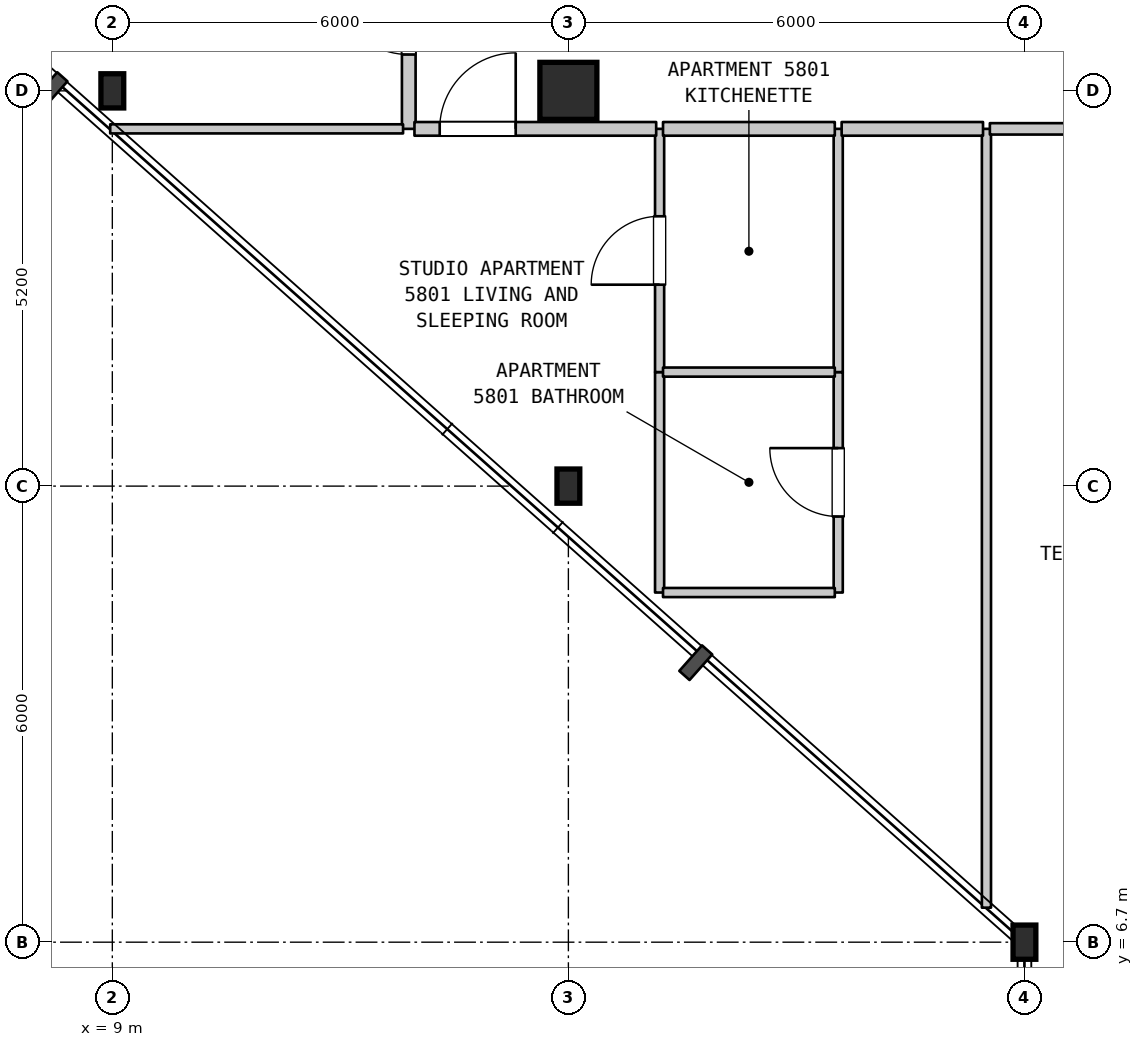
"""IFC4 building model, lengths in metres.
Left out: names, types, materials, properties, quantities, classifications, styles, units other than length and angle.
Written with IfcOpenShell. Run it as: python <this file> out.ifc"""

import sys

from ifc_helpers import new_model, si_unit, direction, frame, frame_2d, origin, origin_2d, place, context, subcontext, project, spatial, rectangle, i_section, extrude, element, fill, save


model = new_model("IFC4")
c1 = context("Model", 3, precision=1e-05, world=origin(), true_north=direction((0.0, 1.0)))
c2 = subcontext(c1, "Body", "Model", "MODEL_VIEW")
j1 = project(units=[si_unit("LENGTHUNIT", "METRE"), si_unit("PLANEANGLEUNIT", "RADIAN")], contexts=[c1])
p1 = place(None, origin())
s1 = spatial("IfcSite", under=j1, at=p1, CompositionType="ELEMENT")
p2 = place(p1, origin())
s2 = spatial("IfcBuilding", under=s1, at=p2, CompositionType="ELEMENT")
p3 = place(p2, frame((0.0, 0.0, 233.9)))
s3 = spatial("IfcBuildingStorey", under=s2, at=p3, CompositionType="ELEMENT", Elevation=233.9)
for number, where, z_axis, x_axis in (
    (1, (9.0, 17.9, 0.0), (0.0, 0.0, 1.0), (1.0, 0.0, 0.0)),
    (2, (15.0, 12.7, 0.0), (0.0, 0.0, 1.0), (1.0, 0.0, 0.0)),
):
    element("IfcColumn", number, at=place(p3, frame(where, z_axis=z_axis, x_axis=x_axis)), inside=s3, PredefinedType="COLUMN", context=c2, shape_type="SweptSolid", body=[
        extrude(i_section(OverallWidth=0.3, OverallDepth=0.45, WebThickness=0.014, FlangeThickness=0.026, FilletRadius=0.027, at=origin_2d()), origin(), (0.0, 0.0, 1.0), 3.7),
    ])
p4 = place(p3, frame((15.0, 17.9, 0.0), z_axis=(0.0, 0.0, 1.0), x_axis=(1.0, 0.0, 0.0)))
e3 = element("IfcColumn", 3, at=p4, inside=s3, PredefinedType="COLUMN", context=c2, shape_type="SweptSolid", body=[
    extrude(rectangle(XDim=0.75, YDim=0.75, at=origin_2d()), origin(), (0.0, 0.0, 1.0), 3.7),
])
p5 = place(p3, frame((21.0, 6.7, 0.0), z_axis=(0.0, 0.0, 1.0), x_axis=(1.0, 0.0, 0.0)))
e4 = element("IfcColumn", 4, at=p5, inside=s3, PredefinedType="COLUMN", context=c2, shape_type="SweptSolid", body=[
    extrude(i_section(OverallWidth=0.3, OverallDepth=0.45, WebThickness=0.014, FlangeThickness=0.026, FilletRadius=0.027, at=origin_2d()), origin(), (0.0, 0.0, 1.0), 3.7),
])
p6 = place(p3, frame((12.9, 17.4, 0.0), z_axis=(0.0, 0.0, 1.0), x_axis=(0.0, 1.0, 0.0)))
e5 = element("IfcWall", 5, at=p6, inside=s3, PredefinedType="STANDARD", context=c2, shape_type="SweptSolid", body=[
    extrude(rectangle(XDim=3.1, YDim=0.18, at=frame_2d((1.55, 0.0))), origin(), (0.0, 0.0, 1.0), 3.28),
])
p7 = place(p6, frame((0.978, 0.0, 0.0)))
e6 = element("IfcOpeningElement", 6, at=p7, cuts=e5, PredefinedType="OPENING", context=c2, shape_type="SweptSolid", body=[
    extrude(rectangle(XDim=1.0, YDim=2.15, at=frame_2d((0.5, 1.075))), frame((0.0, 0.1, 0.0), z_axis=(0.0, -1.0, 0.0), x_axis=(1.0, 0.0, 0.0)), (0.0, 0.0, 1.0), 0.2),
])
p8 = place(p3, frame((16.2, 11.3, 0.0), z_axis=(0.0, 0.0, 1.0), x_axis=(0.0, 1.0, 0.0)))
e7 = element("IfcWall", 7, at=p8, inside=s3, PredefinedType="PARTITIONING", context=c2, shape_type="SweptSolid", body=[
    extrude(rectangle(XDim=2.9, YDim=0.12, at=frame_2d((1.45, 0.0))), origin(), (0.0, 0.0, 1.0), 3.28),
])
p9 = place(p3, frame((16.2, 14.2, 0.0), z_axis=(0.0, 0.0, 1.0), x_axis=(0.0, 1.0, 0.0)))
e8 = element("IfcWall", 8, at=p9, inside=s3, PredefinedType="PARTITIONING", context=c2, shape_type="SweptSolid", body=[
    extrude(rectangle(XDim=3.2, YDim=0.12, at=frame_2d((1.6, 0.0))), origin(), (0.0, 0.0, 1.0), 3.28),
])
p10 = place(p9, frame((1.15, 0.0, 0.0)))
e9 = element("IfcOpeningElement", 9, at=p10, cuts=e8, PredefinedType="OPENING", context=c2, shape_type="SweptSolid", body=[
    extrude(rectangle(XDim=0.9, YDim=2.15, at=frame_2d((0.45, 1.075))), frame((0.0, 0.07, 0.0), z_axis=(0.0, -1.0, 0.0), x_axis=(1.0, 0.0, 0.0)), (0.0, 0.0, 1.0), 0.14),
])
p11 = place(p3, frame((18.55, 11.3, 0.0), z_axis=(0.0, 0.0, 1.0), x_axis=(0.0, 1.0, 0.0)))
e10 = element("IfcWall", 10, at=p11, inside=s3, PredefinedType="PARTITIONING", context=c2, shape_type="SweptSolid", body=[
    extrude(rectangle(XDim=2.9, YDim=0.12, at=frame_2d((1.45, 0.0))), origin(), (0.0, 0.0, 1.0), 3.28),
])
p12 = place(p11, frame((1.0, 0.0, 0.0)))
e11 = element("IfcOpeningElement", 11, at=p12, cuts=e10, PredefinedType="OPENING", context=c2, shape_type="SweptSolid", body=[
    extrude(rectangle(XDim=0.9, YDim=2.1, at=frame_2d((0.45, 1.05))), frame((0.0, 0.07, 0.0), z_axis=(0.0, -1.0, 0.0), x_axis=(1.0, 0.0, 0.0)), (0.0, 0.0, 1.0), 0.14),
])
p13 = place(p3, frame((18.55, 14.2, 0.0), z_axis=(0.0, 0.0, 1.0), x_axis=(0.0, 1.0, 0.0)))
e12 = element("IfcWall", 12, at=p13, inside=s3, PredefinedType="PARTITIONING", context=c2, shape_type="SweptSolid", body=[
    extrude(rectangle(XDim=3.2, YDim=0.12, at=frame_2d((1.6, 0.0))), origin(), (0.0, 0.0, 1.0), 3.28),
])
p14 = place(p3, frame((20.5, 7.154, 0.0), z_axis=(0.0, 0.0, 1.0), x_axis=(0.0, 1.0, 0.0)))
e13 = element("IfcWall", 13, at=p14, inside=s3, PredefinedType="PARTITIONING", context=c2, shape_type="SweptSolid", body=[
    extrude(rectangle(XDim=10.246, YDim=0.12, at=frame_2d((5.123, 0.0))), origin(), (0.0, 0.0, 1.0), 3.28),
])
for number, where, z_axis, x_axis in (
    (14, (16.245, 11.3, 0.0), (0.0, 0.0, 1.0), (1.0, 0.0, 0.0)),
    (15, (16.245, 14.2, 0.0), (0.0, 0.0, 1.0), (1.0, 0.0, 0.0)),
):
    element("IfcWall", number, at=place(p3, frame(where, z_axis=z_axis, x_axis=x_axis)), inside=s3, PredefinedType="PARTITIONING", context=c2, shape_type="SweptSolid", body=[
        extrude(rectangle(XDim=2.26, YDim=0.12, at=frame_2d((1.13, 0.0))), origin(), (0.0, 0.0, 1.0), 3.28),
    ])
p15 = place(p3, frame((8.972, 17.4, 0.0), z_axis=(0.0, 0.0, 1.0), x_axis=(1.0, 0.0, 0.0)))
e16 = element("IfcWall", 16, at=p15, inside=s3, PredefinedType="PARTITIONING", context=c2, shape_type="SweptSolid", body=[
    extrude(rectangle(XDim=3.853, YDim=0.12, at=frame_2d((1.927, 0.0))), origin(), (0.0, 0.0, 1.0), 3.28),
])
p16 = place(p3, frame((12.975, 17.4, 0.0), z_axis=(0.0, 0.0, 1.0), x_axis=(1.0, 0.0, 0.0)))
e17 = element("IfcWall", 17, at=p16, inside=s3, PredefinedType="STANDARD", context=c2, shape_type="SweptSolid", body=[
    extrude(rectangle(XDim=3.18, YDim=0.18, at=frame_2d((1.59, 0.0))), origin(), (0.0, 0.0, 1.0), 3.28),
])
p17 = place(p16, frame((0.332, 0.0, 0.0)))
e18 = element("IfcOpeningElement", 18, at=p17, cuts=e17, PredefinedType="OPENING", context=c2, shape_type="SweptSolid", body=[
    extrude(rectangle(XDim=1.0, YDim=2.15, at=frame_2d((0.5, 1.075))), frame((0.0, 0.1, 0.0), z_axis=(0.0, -1.0, 0.0), x_axis=(1.0, 0.0, 0.0)), (0.0, 0.0, 1.0), 0.2),
])
p18 = place(p3, frame((16.245, 17.4, 0.0), z_axis=(0.0, 0.0, 1.0), x_axis=(1.0, 0.0, 0.0)))
e19 = element("IfcWall", 19, at=p18, inside=s3, PredefinedType="STANDARD", context=c2, shape_type="SweptSolid", body=[
    extrude(rectangle(XDim=2.26, YDim=0.18, at=frame_2d((1.13, 0.0))), origin(), (0.0, 0.0, 1.0), 3.28),
])
p19 = place(p3, frame((18.595, 17.4, 0.0), z_axis=(0.0, 0.0, 1.0), x_axis=(1.0, 0.0, 0.0)))
e20 = element("IfcWall", 20, at=p19, inside=s3, PredefinedType="STANDARD", context=c2, shape_type="SweptSolid", body=[
    extrude(rectangle(XDim=1.86, YDim=0.18, at=frame_2d((0.93, 0.0))), origin(), (0.0, 0.0, 1.0), 3.28),
])
p20 = place(p3, frame((20.545, 17.4, 0.0), z_axis=(0.0, 0.0, 1.0), x_axis=(1.0, 0.0, 0.0)))
e21 = element("IfcWall", 21, at=p20, inside=s3, PredefinedType="STANDARD", context=c2, shape_type="SweptSolid", body=[
    extrude(rectangle(XDim=3.61, YDim=0.15, at=frame_2d((1.805, 0.0))), origin(), (0.0, 0.0, 1.0), 3.28),
])
p21 = place(p20, frame((1.305, 0.0, 0.0)))
e22 = element("IfcOpeningElement", 22, at=p21, cuts=e21, PredefinedType="OPENING", context=c2, shape_type="SweptSolid", body=[
    extrude(rectangle(XDim=1.0, YDim=2.15, at=frame_2d((0.5, 1.075))), frame((0.0, 0.085, 0.0), z_axis=(0.0, -1.0, 0.0), x_axis=(1.0, 0.0, 0.0)), (0.0, 0.0, 1.0), 0.17),
])
p22 = place(p7, origin())
e23 = element("IfcDoor", 23, at=p22, inside=s3, OperationType="SINGLE_SWING_RIGHT", PredefinedType="DOOR", context=c2, shape_type="SweptSolid", body=[
    extrude(rectangle(XDim=1.0, YDim=2.15, at=frame_2d((0.5, 1.075))), frame((0.0, 0.025, 0.0), z_axis=(0.0, -1.0, 0.0), x_axis=(1.0, 0.0, 0.0)), (0.0, 0.0, 1.0), 0.05),
])
fill(e6, e23)
p23 = place(p10, origin())
e24 = element("IfcDoor", 24, at=p23, inside=s3, OperationType="SINGLE_SWING_LEFT", PredefinedType="DOOR", context=c2, shape_type="SweptSolid", body=[
    extrude(rectangle(XDim=0.9, YDim=2.15, at=frame_2d((0.45, 1.075))), frame((0.0, 0.025, 0.0), z_axis=(0.0, -1.0, 0.0), x_axis=(1.0, 0.0, 0.0)), (0.0, 0.0, 1.0), 0.05),
])
fill(e9, e24)
p24 = place(p12, origin())
e25 = element("IfcDoor", 25, at=p24, inside=s3, OperationType="SINGLE_SWING_RIGHT", PredefinedType="DOOR", context=c2, shape_type="SweptSolid", body=[
    extrude(rectangle(XDim=0.9, YDim=2.1, at=frame_2d((0.45, 1.05))), frame((0.0, 0.025, 0.0), z_axis=(0.0, -1.0, 0.0), x_axis=(1.0, 0.0, 0.0)), (0.0, 0.0, 1.0), 0.05),
])
fill(e11, e25)
p25 = place(p17, origin())
e26 = element("IfcDoor", 26, at=p25, inside=s3, OperationType="SINGLE_SWING_RIGHT", PredefinedType="DOOR", context=c2, shape_type="SweptSolid", body=[
    extrude(rectangle(XDim=1.0, YDim=2.15, at=frame_2d((0.5, 1.075))), frame((0.0, 0.025, 0.0), z_axis=(0.0, -1.0, 0.0), x_axis=(1.0, 0.0, 0.0)), (0.0, 0.0, 1.0), 0.05),
])
fill(e18, e26)
save(model, sys.argv[1])
